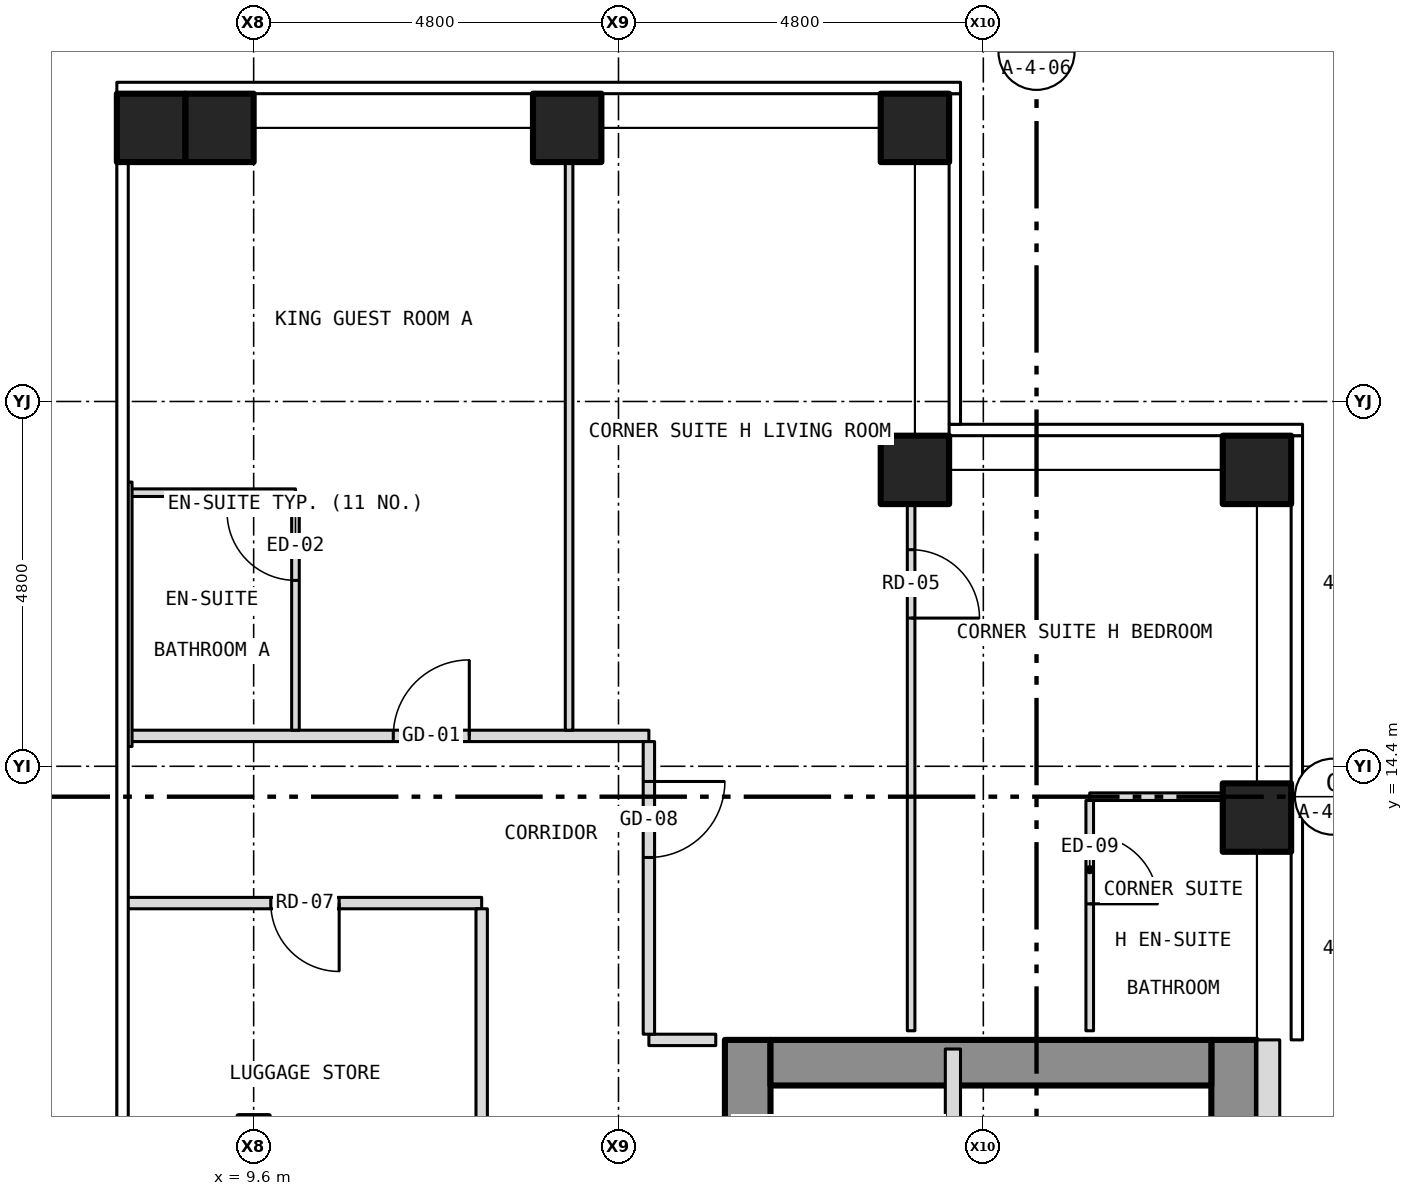
"""IFC4 building model, lengths in metres.
Left out: names, types, materials, properties, quantities, classifications, styles, units other than length and angle.
Written with IfcOpenShell. Run it as: python <this file> out.ifc"""

import sys

from ifc_helpers import new_model, si_unit, direction, frame, frame_2d, origin, origin_2d, place, context, subcontext, project, spatial, rectangle, hollow_rectangle, extrude, element, fill, save


model = new_model("IFC4")
c1 = context("Model", 3, precision=1e-05, world=origin(), true_north=direction((0.0, 1.0)))
c2 = subcontext(c1, "Body", "Model", "MODEL_VIEW")
j1 = project(units=[si_unit("LENGTHUNIT", "METRE"), si_unit("PLANEANGLEUNIT", "RADIAN")], contexts=[c1])
p1 = place(None, origin())
s1 = spatial("IfcSite", under=j1, at=p1, CompositionType="ELEMENT")
p2 = place(p1, origin())
s2 = spatial("IfcBuilding", under=s1, at=p2, CompositionType="ELEMENT")
p3 = place(p2, frame((0.0, 0.0, 120.5)))
s3 = spatial("IfcBuildingStorey", under=s2, at=p3, CompositionType="ELEMENT", Elevation=120.5)
for number, where, z_axis, x_axis in (
    (1, (9.15, 22.8, -0.15), (0.0, 0.0, 1.0), (1.0, 0.0, 0.0)),
    (2, (13.725, 22.8, -0.15), (0.0, 0.0, 1.0), (1.0, 0.0, 0.0)),
    (3, (18.3, 22.8, -0.15), (0.0, 0.0, 1.0), (1.0, 0.0, 0.0)),
    (4, (22.8, 13.725, -0.15), (0.0, 0.0, 1.0), (1.0, 0.0, 0.0)),
    (5, (22.8, 18.3, -0.15), (0.0, 0.0, 1.0), (1.0, 0.0, 0.0)),
    (6, (18.3, 18.3, -0.15), (0.0, 0.0, 1.0), (1.0, 0.0, 0.0)),
    (7, (8.25, 22.8, -0.15), (0.0, 0.0, 1.0), (1.0, 0.0, 0.0)),
):
    element("IfcColumn", number, at=place(p3, frame(where, z_axis=z_axis, x_axis=x_axis)), inside=s3, PredefinedType="COLUMN", context=c2, shape_type="SweptSolid", body=[
        extrude(hollow_rectangle(XDim=0.9, YDim=0.9, WallThickness=0.05, at=origin_2d()), origin(), (0.0, 0.0, 1.0), 3.5),
    ])
p4 = place(p3, frame((16.1, -10.8, 0.0), z_axis=(0.0, 0.0, 1.0), x_axis=(0.0, 1.0, 0.0)))
e8 = element("IfcWall", 8, at=p4, inside=s3, PredefinedType="SHEAR", context=c2, shape_type="SweptSolid", body=[
    extrude(rectangle(XDim=21.6, YDim=0.6, at=frame_2d((10.8, 0.0))), origin(), (0.0, 0.0, 1.0), 3.25),
])
p5 = place(p4, frame((9.4, 0.0, 0.0)))
e9 = element("IfcOpeningElement", 9, at=p5, cuts=e8, PredefinedType="OPENING", context=c2, shape_type="SweptSolid", body=[
    extrude(rectangle(XDim=1.1, YDim=2.1, at=frame_2d((0.55, 1.05))), frame((0.0, 0.312, 0.0), z_axis=(0.0, -1.0, 0.0), x_axis=(1.0, 0.0, 0.0)), (0.0, 0.0, 1.0), 0.624),
])
p6 = place(p4, frame((11.5, 0.0, 0.0)))
e10 = element("IfcOpeningElement", 10, at=p6, cuts=e8, PredefinedType="OPENING", context=c2, shape_type="SweptSolid", body=[
    extrude(rectangle(XDim=1.1, YDim=2.1, at=frame_2d((0.55, 1.05))), frame((0.0, 0.312, 0.0), z_axis=(0.0, -1.0, 0.0), x_axis=(1.0, 0.0, 0.0)), (0.0, 0.0, 1.0), 0.624),
])
p7 = place(p4, frame((13.6, 0.0, 0.0)))
e11 = element("IfcOpeningElement", 11, at=p7, cuts=e8, PredefinedType="OPENING", context=c2, shape_type="SweptSolid", body=[
    extrude(rectangle(XDim=1.1, YDim=2.1, at=frame_2d((0.55, 1.05))), frame((0.0, 0.312, 0.0), z_axis=(0.0, -1.0, 0.0), x_axis=(1.0, 0.0, 0.0)), (0.0, 0.0, 1.0), 0.624),
])
p8 = place(p4, frame((15.7, 0.0, 0.0)))
e12 = element("IfcOpeningElement", 12, at=p8, cuts=e8, PredefinedType="OPENING", context=c2, shape_type="SweptSolid", body=[
    extrude(rectangle(XDim=1.1, YDim=2.1, at=frame_2d((0.55, 1.05))), frame((0.0, 0.312, 0.0), z_axis=(0.0, -1.0, 0.0), x_axis=(1.0, 0.0, 0.0)), (0.0, 0.0, 1.0), 0.624),
])
p9 = place(p4, frame((17.8, 0.0, 0.0)))
e13 = element("IfcOpeningElement", 13, at=p9, cuts=e8, PredefinedType="OPENING", context=c2, shape_type="SweptSolid", body=[
    extrude(rectangle(XDim=1.1, YDim=2.1, at=frame_2d((0.55, 1.05))), frame((0.0, 0.312, 0.0), z_axis=(0.0, -1.0, 0.0), x_axis=(1.0, 0.0, 0.0)), (0.0, 0.0, 1.0), 0.624),
])
p10 = place(p4, frame((5.642, 0.0, 0.0)))
e14 = element("IfcOpeningElement", 14, at=p10, cuts=e8, PredefinedType="OPENING", context=c2, shape_type="SweptSolid", body=[
    extrude(rectangle(XDim=1.1, YDim=2.1, at=frame_2d((0.55, 1.05))), frame((0.0, 0.312, 0.0), z_axis=(0.0, -1.0, 0.0), x_axis=(1.0, 0.0, 0.0)), (0.0, 0.0, 1.0), 0.624),
])
p11 = place(p4, frame((7.5, 0.0, 0.0)))
e15 = element("IfcOpeningElement", 15, at=p11, cuts=e8, PredefinedType="OPENING", context=c2, shape_type="SweptSolid", body=[
    extrude(rectangle(XDim=1.1, YDim=2.1, at=frame_2d((0.55, 1.05))), frame((0.0, 0.312, 0.0), z_axis=(0.0, -1.0, 0.0), x_axis=(1.0, 0.0, 0.0)), (0.0, 0.0, 1.0), 0.624),
])
p12 = place(p3, frame((22.5, -10.8, 0.0), z_axis=(0.0, 0.0, 1.0), x_axis=(0.0, 1.0, 0.0)))
e16 = element("IfcWall", 16, at=p12, inside=s3, PredefinedType="SHEAR", context=c2, shape_type="SweptSolid", body=[
    extrude(rectangle(XDim=21.6, YDim=0.6, at=frame_2d((10.8, 0.0))), origin(), (0.0, 0.0, 1.0), 3.25),
])
p13 = place(p3, frame((16.4, 10.5, 0.0), z_axis=(0.0, 0.0, 1.0), x_axis=(1.0, 0.0, 0.0)))
e17 = element("IfcWall", 17, at=p13, inside=s3, PredefinedType="SHEAR", context=c2, shape_type="SweptSolid", body=[
    extrude(rectangle(XDim=5.8, YDim=0.6, at=frame_2d((2.9, 0.0))), origin(), (0.0, 0.0, 1.0), 3.25),
])
p14 = place(p3, frame((22.95, -10.8, 0.0), z_axis=(0.0, 0.0, 1.0), x_axis=(0.0, 1.0, 0.0)))
e18 = element("IfcWall", 18, at=p14, inside=s3, PredefinedType="SOLIDWALL", context=c2, shape_type="SweptSolid", body=[
    extrude(rectangle(XDim=21.6, YDim=0.3, at=frame_2d((10.8, 0.0))), origin(), (0.0, 0.0, 1.0), 3.5),
])
p15 = place(p14, frame((2.95, 0.0, 1.0)))
e19 = element("IfcOpeningElement", 19, at=p15, cuts=e18, PredefinedType="OPENING", context=c2, shape_type="SweptSolid", body=[
    extrude(rectangle(XDim=0.6, YDim=1.5, at=frame_2d((0.3, 0.75))), frame((0.0, 0.162, 0.0), z_axis=(0.0, -1.0, 0.0), x_axis=(1.0, 0.0, 0.0)), (0.0, 0.0, 1.0), 0.324),
])
p16 = place(p3, frame((14.8, 10.8, 0.0), z_axis=(0.0, 0.0, 1.0), x_axis=(1.0, 0.0, 0.0)))
e20 = element("IfcWall", 20, at=p16, inside=s3, PredefinedType="PARTITIONING", context=c2, shape_type="SweptSolid", body=[
    extrude(rectangle(XDim=0.88, YDim=0.15, at=frame_2d((0.44, 0.0))), origin(), (0.0, 0.0, 1.0), 3.35),
])
p17 = place(p3, frame((7.92, 12.6, 0.0), z_axis=(0.0, 0.0, 1.0), x_axis=(1.0, 0.0, 0.0)))
e21 = element("IfcWall", 21, at=p17, inside=s3, PredefinedType="PARTITIONING", context=c2, shape_type="SweptSolid", body=[
    extrude(rectangle(XDim=4.68, YDim=0.15, at=frame_2d((2.34, 0.0))), origin(), (0.0, 0.0, 1.0), 3.35),
])
p18 = place(p17, frame((1.905, 0.0, 0.0)))
e22 = element("IfcOpeningElement", 22, at=p18, cuts=e21, PredefinedType="OPENING", context=c2, shape_type="SweptSolid", body=[
    extrude(rectangle(XDim=0.9, YDim=2.1, at=frame_2d((0.45, 1.05))), frame((0.0, 0.087, 0.0), z_axis=(0.0, -1.0, 0.0), x_axis=(1.0, 0.0, 0.0)), (0.0, 0.0, 1.0), 0.174),
])
p19 = place(p3, frame((20.6, 14.0, 0.0), z_axis=(0.0, 0.0, 1.0), x_axis=(1.0, 0.0, 0.0)))
e23 = element("IfcWall", 23, at=p19, inside=s3, PredefinedType="PARTITIONING", context=c2, shape_type="SweptSolid", body=[
    extrude(rectangle(XDim=2.08, YDim=0.1, at=frame_2d((1.04, 0.0))), origin(), (0.0, 0.0, 1.0), 3.35),
])
p20 = place(p3, frame((7.95, 14.8, 0.0), z_axis=(0.0, 0.0, 1.0), x_axis=(1.0, 0.0, 0.0)))
e24 = element("IfcWall", 24, at=p20, inside=s3, PredefinedType="PARTITIONING", context=c2, shape_type="SweptSolid", body=[
    extrude(rectangle(XDim=6.85, YDim=0.15, at=frame_2d((3.425, 0.0))), origin(), (0.0, 0.0, 1.0), 3.35),
])
p21 = place(p20, frame((3.487, 0.0, 0.0)))
e25 = element("IfcOpeningElement", 25, at=p21, cuts=e24, PredefinedType="OPENING", context=c2, shape_type="SweptSolid", body=[
    extrude(rectangle(XDim=1.0, YDim=2.1, at=frame_2d((0.5, 1.05))), frame((0.0, 0.087, 0.0), z_axis=(0.0, -1.0, 0.0), x_axis=(1.0, 0.0, 0.0)), (0.0, 0.0, 1.0), 0.174),
])
p22 = place(p3, frame((7.95, 18.0, 0.0), z_axis=(0.0, 0.0, 1.0), x_axis=(1.0, 0.0, 0.0)))
e26 = element("IfcWall", 26, at=p22, inside=s3, PredefinedType="PARTITIONING", context=c2, shape_type="SweptSolid", body=[
    extrude(rectangle(XDim=2.2, YDim=0.1, at=frame_2d((1.1, 0.0))), origin(), (0.0, 0.0, 1.0), 3.35),
])
p23 = place(p3, frame((7.95, 14.66, 0.0), z_axis=(0.0, 0.0, 1.0), x_axis=(0.0, 1.0, 0.0)))
e27 = element("IfcWall", 27, at=p23, inside=s3, PredefinedType="PARTITIONING", context=c2, shape_type="SweptSolid", body=[
    extrude(rectangle(XDim=3.48, YDim=0.1, at=frame_2d((1.74, 0.0))), origin(), (0.0, 0.0, 1.0), 2.733),
])
p24 = place(p3, frame((10.15, 14.875, 0.0), z_axis=(0.0, 0.0, 1.0), x_axis=(0.0, 1.0, 0.0)))
e28 = element("IfcWall", 28, at=p24, inside=s3, PredefinedType="PARTITIONING", context=c2, shape_type="SweptSolid", body=[
    extrude(rectangle(XDim=3.075, YDim=0.1, at=frame_2d((1.538, 0.0))), origin(), (0.0, 0.0, 1.0), 3.35),
])
p25 = place(p24, frame((1.971, 0.0, 0.0)))
e29 = element("IfcOpeningElement", 29, at=p25, cuts=e28, PredefinedType="OPENING", context=c2, shape_type="SweptSolid", body=[
    extrude(rectangle(XDim=0.9, YDim=2.1, at=frame_2d((0.45, 1.05))), frame((0.0, 0.062, 0.0), z_axis=(0.0, -1.0, 0.0), x_axis=(1.0, 0.0, 0.0)), (0.0, 0.0, 1.0), 0.124),
])
p26 = place(p3, frame((12.6, 8.175, 0.0), z_axis=(0.0, 0.0, 1.0), x_axis=(0.0, 1.0, 0.0)))
e30 = element("IfcWall", 30, at=p26, inside=s3, PredefinedType="PARTITIONING", context=c2, shape_type="SweptSolid", body=[
    extrude(rectangle(XDim=4.35, YDim=0.15, at=frame_2d((2.175, 0.0))), origin(), (0.0, 0.0, 1.0), 3.35),
])
p27 = place(p3, frame((13.75, 14.875, 0.0), z_axis=(0.0, 0.0, 1.0), x_axis=(0.0, 1.0, 0.0)))
e31 = element("IfcWall", 31, at=p27, inside=s3, PredefinedType="PARTITIONING", context=c2, shape_type="SweptSolid", body=[
    extrude(rectangle(XDim=7.805, YDim=0.1, at=frame_2d((3.902, 0.0))), origin(), (0.0, 0.0, 1.0), 3.35),
])
p28 = place(p3, frame((14.8, 10.875, 0.0), z_axis=(0.0, 0.0, 1.0), x_axis=(0.0, 1.0, 0.0)))
e32 = element("IfcWall", 32, at=p28, inside=s3, PredefinedType="PARTITIONING", context=c2, shape_type="SweptSolid", body=[
    extrude(rectangle(XDim=3.85, YDim=0.15, at=frame_2d((1.925, 0.0))), origin(), (0.0, 0.0, 1.0), 3.35),
])
p29 = place(p28, frame((2.325, 0.0, 0.0)))
e33 = element("IfcOpeningElement", 33, at=p29, cuts=e32, PredefinedType="OPENING", context=c2, shape_type="SweptSolid", body=[
    extrude(rectangle(XDim=1.0, YDim=2.1, at=frame_2d((0.5, 1.05))), frame((0.0, 0.087, 0.0), z_axis=(0.0, -1.0, 0.0), x_axis=(1.0, 0.0, 0.0)), (0.0, 0.0, 1.0), 0.174),
])
p30 = place(p3, frame((18.25, 10.92, 0.0), z_axis=(0.0, 0.0, 1.0), x_axis=(0.0, 1.0, 0.0)))
e34 = element("IfcWall", 34, at=p30, inside=s3, PredefinedType="PARTITIONING", context=c2, shape_type="SweptSolid", body=[
    extrude(rectangle(XDim=7.271, YDim=0.1, at=frame_2d((3.635, 0.0))), origin(), (0.0, 0.0, 1.0), 3.35),
])
p31 = place(p30, frame((5.43, 0.0, 0.0)))
e35 = element("IfcOpeningElement", 35, at=p31, cuts=e34, PredefinedType="OPENING", context=c2, shape_type="SweptSolid", body=[
    extrude(rectangle(XDim=0.9, YDim=2.1, at=frame_2d((0.45, 1.05))), frame((0.0, 0.062, 0.0), z_axis=(0.0, -1.0, 0.0), x_axis=(1.0, 0.0, 0.0)), (0.0, 0.0, 1.0), 0.124),
])
p32 = place(p3, frame((18.8, -1.8, 0.0), z_axis=(0.0, 0.0, 1.0), x_axis=(0.0, 1.0, 0.0)))
e36 = element("IfcWall", 36, at=p32, inside=s3, PredefinedType="PARTITIONING", context=c2, shape_type="SweptSolid", body=[
    extrude(rectangle(XDim=12.48, YDim=0.2, at=frame_2d((6.24, 0.0))), origin(), (0.0, 0.0, 1.0), 3.25),
])
p33 = place(p3, frame((20.6, 10.92, 0.0), z_axis=(0.0, 0.0, 1.0), x_axis=(0.0, 1.0, 0.0)))
e37 = element("IfcWall", 37, at=p33, inside=s3, PredefinedType="PARTITIONING", context=c2, shape_type="SweptSolid", body=[
    extrude(rectangle(XDim=3.03, YDim=0.1, at=frame_2d((1.515, 0.0))), origin(), (0.0, 0.0, 1.0), 3.35),
])
p34 = place(p33, frame((1.67, 0.0, 0.0)))
e38 = element("IfcOpeningElement", 38, at=p34, cuts=e37, PredefinedType="OPENING", context=c2, shape_type="SweptSolid", body=[
    extrude(rectangle(XDim=0.9, YDim=2.1, at=frame_2d((0.45, 1.05))), frame((0.0, 0.062, 0.0), z_axis=(0.0, -1.0, 0.0), x_axis=(1.0, 0.0, 0.0)), (0.0, 0.0, 1.0), 0.124),
])
p35 = place(p21, origin())
e39 = element("IfcDoor", 39, at=p35, inside=s3, OperationType="SINGLE_SWING_RIGHT", PredefinedType="DOOR", context=c2, shape_type="SweptSolid", body=[
    extrude(rectangle(XDim=1.0, YDim=2.1, at=frame_2d((0.5, 1.05))), frame((0.0, 0.025, 0.0), z_axis=(0.0, -1.0, 0.0), x_axis=(1.0, 0.0, 0.0)), (0.0, 0.0, 1.0), 0.05),
])
fill(e25, e39)
p36 = place(p25, origin())
e40 = element("IfcDoor", 40, at=p36, inside=s3, OperationType="SINGLE_SWING_RIGHT", PredefinedType="DOOR", context=c2, shape_type="SweptSolid", body=[
    extrude(rectangle(XDim=0.9, YDim=2.1, at=frame_2d((0.45, 1.05))), frame((0.0, 0.025, 0.0), z_axis=(0.0, -1.0, 0.0), x_axis=(1.0, 0.0, 0.0)), (0.0, 0.0, 1.0), 0.05),
])
fill(e29, e40)
p37 = place(p29, origin())
e41 = element("IfcDoor", 41, at=p37, inside=s3, OperationType="SINGLE_SWING_RIGHT", PredefinedType="DOOR", context=c2, shape_type="SweptSolid", body=[
    extrude(rectangle(XDim=1.0, YDim=2.1, at=frame_2d((0.5, 1.05))), frame((0.0, 0.025, 0.0), z_axis=(0.0, -1.0, 0.0), x_axis=(1.0, 0.0, 0.0)), (0.0, 0.0, 1.0), 0.05),
])
fill(e33, e41)
p38 = place(p31, origin())
e42 = element("IfcDoor", 42, at=p38, inside=s3, OperationType="SINGLE_SWING_LEFT", PredefinedType="DOOR", context=c2, shape_type="SweptSolid", body=[
    extrude(rectangle(XDim=0.9, YDim=2.1, at=frame_2d((0.45, 1.05))), frame((0.0, 0.025, 0.0), z_axis=(0.0, -1.0, 0.0), x_axis=(1.0, 0.0, 0.0)), (0.0, 0.0, 1.0), 0.05),
])
fill(e35, e42)
p39 = place(p34, origin())
e43 = element("IfcDoor", 43, at=p39, inside=s3, OperationType="SINGLE_SWING_LEFT", PredefinedType="DOOR", context=c2, shape_type="SweptSolid", body=[
    extrude(rectangle(XDim=0.9, YDim=2.1, at=frame_2d((0.45, 1.05))), frame((0.0, 0.025, 0.0), z_axis=(0.0, -1.0, 0.0), x_axis=(1.0, 0.0, 0.0)), (0.0, 0.0, 1.0), 0.05),
])
fill(e38, e43)
p40 = place(p18, origin())
e44 = element("IfcDoor", 44, at=p40, inside=s3, OperationType="SINGLE_SWING_RIGHT", PredefinedType="DOOR", context=c2, shape_type="SweptSolid", body=[
    extrude(rectangle(XDim=0.9, YDim=2.1, at=frame_2d((0.45, 1.05))), frame((0.0, 0.025, 0.0), z_axis=(0.0, -1.0, 0.0), x_axis=(1.0, 0.0, 0.0)), (0.0, 0.0, 1.0), 0.05),
])
fill(e22, e44)
save(model, sys.argv[1])
